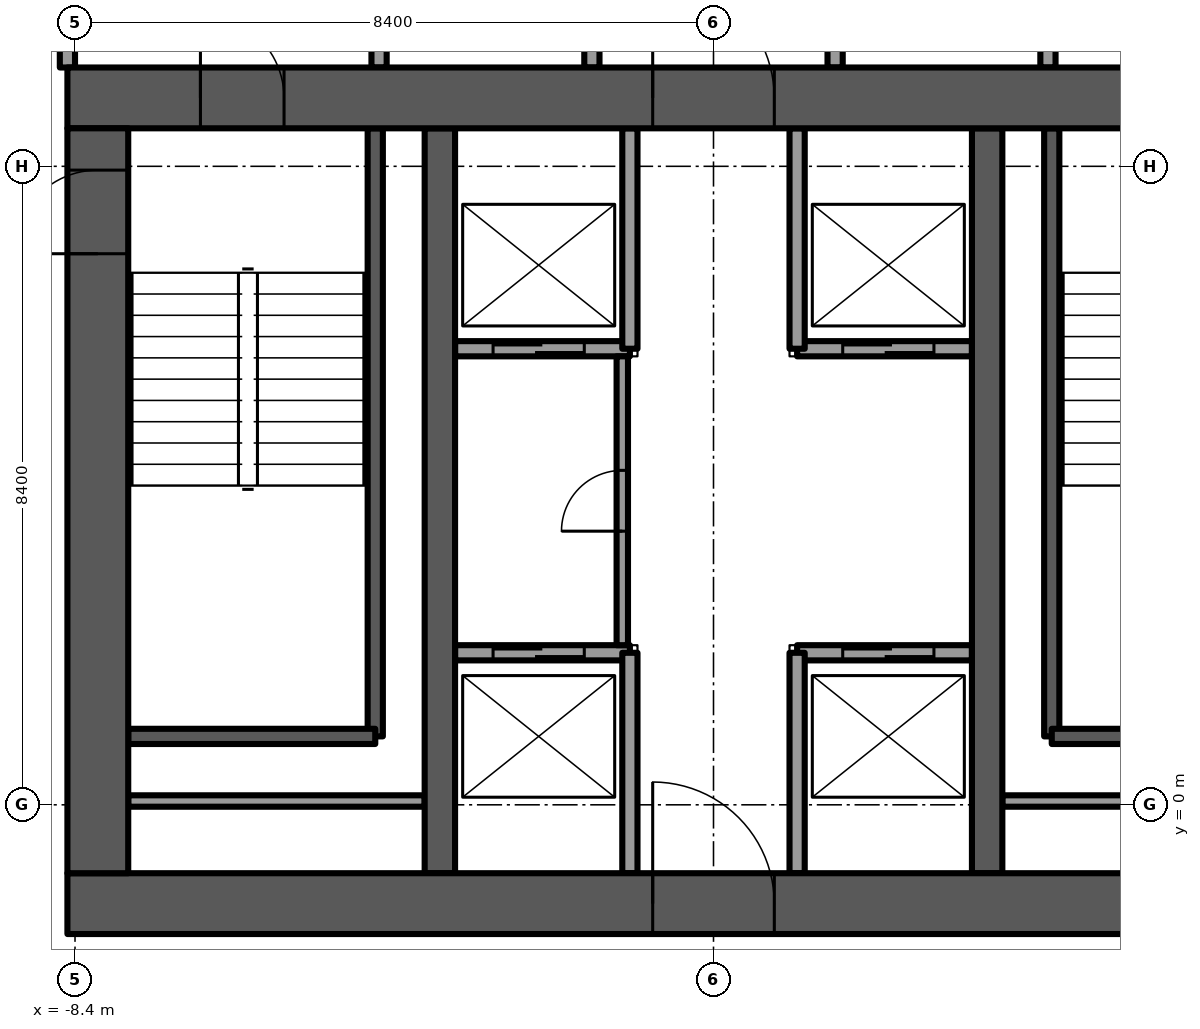
"""IFC4 building model, lengths in metres.
Left out: names, types, materials, properties, quantities, classifications, styles, units other than length and angle.
Written with IfcOpenShell. Run it as: python <this file> out.ifc"""

import sys

from ifc_helpers import new_model, si_unit, direction, frame, frame_2d, origin, place, context, subcontext, project, spatial, rectangle, extrude, element, fill, save


model = new_model("IFC4")
c1 = context("Model", 3, precision=1e-05, world=origin(), true_north=direction((0.0, 1.0)))
c2 = subcontext(c1, "Body", "Model", "MODEL_VIEW")
j1 = project(units=[si_unit("LENGTHUNIT", "METRE"), si_unit("PLANEANGLEUNIT", "RADIAN")], contexts=[c1])
p1 = place(None, origin())
s1 = spatial("IfcSite", under=j1, at=p1, CompositionType="ELEMENT")
p2 = place(p1, origin())
s2 = spatial("IfcBuilding", under=s1, at=p2, CompositionType="ELEMENT")
p3 = place(p2, frame((0.0, 0.0, 179.5)))
s3 = spatial("IfcBuildingStorey", under=s2, at=p3, CompositionType="ELEMENT", Elevation=179.5)
p4 = place(p3, frame((-8.5, -1.3, -0.3), z_axis=(0.0, 0.0, 1.0), x_axis=(1.0, 0.0, 0.0)))
e1 = element("IfcWall", 1, at=p4, inside=s3, PredefinedType="SHEAR", context=c2, shape_type="SweptSolid", body=[
    extrude(rectangle(XDim=17.0, YDim=0.8, at=frame_2d((8.5, 0.0))), origin(), (0.0, 0.0, 1.0), 3.75),
])
p5 = place(p4, frame((7.7, 0.0, 0.0)))
e2 = element("IfcOpeningElement", 2, at=p5, cuts=e1, PredefinedType="OPENING", context=c2, shape_type="SweptSolid", body=[
    extrude(rectangle(XDim=1.6, YDim=2.1, at=frame_2d((0.8, 1.05))), frame((0.0, 0.4, 0.0), z_axis=(0.0, -1.0, 0.0), x_axis=(1.0, 0.0, 0.0)), (0.0, 0.0, 1.0), 0.8),
])
p6 = place(p3, frame((-8.5, 9.3, -0.3), z_axis=(0.0, 0.0, 1.0), x_axis=(1.0, 0.0, 0.0)))
e3 = element("IfcWall", 3, at=p6, inside=s3, PredefinedType="SHEAR", context=c2, shape_type="SweptSolid", body=[
    extrude(rectangle(XDim=17.0, YDim=0.8, at=frame_2d((8.5, 0.0))), origin(), (0.0, 0.0, 1.0), 3.75),
])
p7 = place(p6, frame((7.7, 0.0, 0.0)))
e4 = element("IfcOpeningElement", 4, at=p7, cuts=e3, PredefinedType="OPENING", context=c2, shape_type="SweptSolid", body=[
    extrude(rectangle(XDim=1.6, YDim=2.1, at=frame_2d((0.8, 1.05))), frame((0.0, 0.4, 0.0), z_axis=(0.0, -1.0, 0.0), x_axis=(1.0, 0.0, 0.0)), (0.0, 0.0, 1.0), 0.8),
])
p8 = place(p6, frame((1.75, 0.0, 0.0)))
e5 = element("IfcOpeningElement", 5, at=p8, cuts=e3, PredefinedType="OPENING", context=c2, shape_type="SweptSolid", body=[
    extrude(rectangle(XDim=1.1, YDim=2.1, at=frame_2d((0.55, 1.05))), frame((0.0, 0.4, 0.0), z_axis=(0.0, -1.0, 0.0), x_axis=(1.0, 0.0, 0.0)), (0.0, 0.0, 1.0), 0.8),
])
p9 = place(p6, frame((14.15, 0.0, 0.0)))
e6 = element("IfcOpeningElement", 6, at=p9, cuts=e3, PredefinedType="OPENING", context=c2, shape_type="SweptSolid", body=[
    extrude(rectangle(XDim=1.1, YDim=2.1, at=frame_2d((0.55, 1.05))), frame((0.0, 0.4, 0.0), z_axis=(0.0, -1.0, 0.0), x_axis=(1.0, 0.0, 0.0)), (0.0, 0.0, 1.0), 0.8),
])
p10 = place(p3, frame((-8.1, -0.9, -0.3), z_axis=(0.0, 0.0, 1.0), x_axis=(0.0, 1.0, 0.0)))
e7 = element("IfcWall", 7, at=p10, inside=s3, PredefinedType="SHEAR", context=c2, shape_type="SweptSolid", body=[
    extrude(rectangle(XDim=9.8, YDim=0.8, at=frame_2d((4.9, 0.0))), origin(), (0.0, 0.0, 1.0), 3.75),
])
p11 = place(p10, frame((8.15, 0.0, 0.0)))
e8 = element("IfcOpeningElement", 8, at=p11, cuts=e7, PredefinedType="OPENING", context=c2, shape_type="SweptSolid", body=[
    extrude(rectangle(XDim=1.1, YDim=2.1, at=frame_2d((0.55, 1.05))), frame((0.0, 0.4, 0.0), z_axis=(0.0, -1.0, 0.0), x_axis=(1.0, 0.0, 0.0)), (0.0, 0.0, 1.0), 0.8),
])
for number, where, z_axis, x_axis in (
    (9, (-3.6, -0.9, -0.3), (0.0, 0.0, 1.0), (0.0, 1.0, 0.0)),
    (10, (3.6, -0.9, -0.3), (0.0, 0.0, 1.0), (0.0, 1.0, 0.0)),
):
    element("IfcWall", number, at=place(p3, frame(where, z_axis=z_axis, x_axis=x_axis)), inside=s3, PredefinedType="SHEAR", context=c2, shape_type="SweptSolid", body=[
        extrude(rectangle(XDim=9.8, YDim=0.4, at=frame_2d((4.9, 0.0))), origin(), (0.0, 0.0, 1.0), 3.75),
    ])
p12 = place(p3, frame((-7.109, 17.292, 0.0), z_axis=(0.0, 0.0, 1.0), x_axis=(-0.499999728453, -0.866025560562, 0.0)))
e11 = element("IfcWall", 11, at=p12, inside=s3, PredefinedType="SOLIDWALL", context=c2, shape_type="SweptSolid", body=[
    extrude(rectangle(XDim=20.071, YDim=0.15, at=frame_2d((10.035, 0.0))), origin(), (0.0, 0.0, 1.0), 3.45),
])
p13 = place(p12, frame((3.868, 0.0, 0.15)))
e12 = element("IfcOpeningElement", 12, at=p13, cuts=e11, PredefinedType="OPENING", context=c2, shape_type="SweptSolid", body=[
    extrude(rectangle(XDim=1.4, YDim=2.85, at=frame_2d((0.7, 1.425))), frame((0.0, 0.075, 0.0), z_axis=(0.0, -1.0, 0.0), x_axis=(1.0, 0.0, 0.0)), (0.0, 0.0, 1.0), 0.15),
])
p14 = place(p12, frame((7.521, 0.0, 0.15)))
e13 = element("IfcOpeningElement", 13, at=p14, cuts=e11, PredefinedType="OPENING", context=c2, shape_type="SweptSolid", body=[
    extrude(rectangle(XDim=1.6, YDim=2.85, at=frame_2d((0.8, 1.425))), frame((0.0, 0.075, 0.0), z_axis=(0.0, -1.0, 0.0), x_axis=(1.0, 0.0, 0.0)), (0.0, 0.0, 1.0), 0.15),
])
p15 = place(p12, frame((9.721, 0.0, 0.15)))
e14 = element("IfcOpeningElement", 14, at=p15, cuts=e11, PredefinedType="OPENING", context=c2, shape_type="SweptSolid", body=[
    extrude(rectangle(XDim=1.4, YDim=2.85, at=frame_2d((0.7, 1.425))), frame((0.0, 0.075, 0.0), z_axis=(0.0, -1.0, 0.0), x_axis=(1.0, 0.0, 0.0)), (0.0, 0.0, 1.0), 0.15),
])
p16 = place(p12, frame((11.721, 0.0, 0.15)))
e15 = element("IfcOpeningElement", 15, at=p16, cuts=e11, PredefinedType="OPENING", context=c2, shape_type="SweptSolid", body=[
    extrude(rectangle(XDim=1.6, YDim=2.85, at=frame_2d((0.8, 1.425))), frame((0.0, 0.075, 0.0), z_axis=(0.0, -1.0, 0.0), x_axis=(1.0, 0.0, 0.0)), (0.0, 0.0, 1.0), 0.15),
])
p17 = place(p12, frame((13.921, 0.0, 0.15)))
e16 = element("IfcOpeningElement", 16, at=p17, cuts=e11, PredefinedType="OPENING", context=c2, shape_type="SweptSolid", body=[
    extrude(rectangle(XDim=1.4, YDim=2.85, at=frame_2d((0.7, 1.425))), frame((0.0, 0.075, 0.0), z_axis=(0.0, -1.0, 0.0), x_axis=(1.0, 0.0, 0.0)), (0.0, 0.0, 1.0), 0.15),
])
p18 = place(p12, frame((18.121, 0.0, 0.0)))
e17 = element("IfcOpeningElement", 17, at=p18, cuts=e11, PredefinedType="OPENING", context=c2, shape_type="SweptSolid", body=[
    extrude(rectangle(XDim=1.4, YDim=2.4, at=frame_2d((0.7, 1.2))), frame((0.0, 0.075, 0.0), z_axis=(0.0, -1.0, 0.0), x_axis=(1.0, 0.0, 0.0)), (0.0, 0.0, 1.0), 0.15),
])
p19 = place(p12, frame((0.452, 0.0, 0.15)))
e18 = element("IfcOpeningElement", 18, at=p19, cuts=e11, PredefinedType="OPENING", context=c2, shape_type="SweptSolid", body=[
    extrude(rectangle(XDim=1.6, YDim=2.73, at=frame_2d((0.8, 1.365))), frame((0.0, 0.075, 0.0), z_axis=(0.0, -1.0, 0.0), x_axis=(1.0, 0.0, 0.0)), (0.0, 0.0, 1.0), 0.15),
])
p20 = place(p3, frame((-3.4, 2.0, 0.0), z_axis=(0.0, 0.0, 1.0), x_axis=(1.0, 0.0, 0.0)))
e19 = element("IfcWall", 19, at=p20, inside=s3, PredefinedType="PARTITIONING", context=c2, shape_type="SweptSolid", body=[
    extrude(rectangle(XDim=2.3, YDim=0.2, at=frame_2d((1.15, 0.0))), origin(), (0.0, 0.0, 1.0), 3.45),
])
p21 = place(p20, frame((0.5, 0.0, 0.0)))
e20 = element("IfcOpeningElement", 20, at=p21, cuts=e19, PredefinedType="OPENING", context=c2, shape_type="SweptSolid", body=[
    extrude(rectangle(XDim=1.2, YDim=2.1, at=frame_2d((0.6, 1.05))), frame((0.0, 0.1, 0.0), z_axis=(0.0, -1.0, 0.0), x_axis=(1.0, 0.0, 0.0)), (0.0, 0.0, 1.0), 0.2),
])
p22 = place(p3, frame((-3.4, 6.0, 0.0), z_axis=(0.0, 0.0, 1.0), x_axis=(1.0, 0.0, 0.0)))
e21 = element("IfcWall", 21, at=p22, inside=s3, PredefinedType="PARTITIONING", context=c2, shape_type="SweptSolid", body=[
    extrude(rectangle(XDim=2.3, YDim=0.2, at=frame_2d((1.15, 0.0))), origin(), (0.0, 0.0, 1.0), 3.45),
])
p23 = place(p22, frame((0.5, 0.0, 0.0)))
e22 = element("IfcOpeningElement", 22, at=p23, cuts=e21, PredefinedType="OPENING", context=c2, shape_type="SweptSolid", body=[
    extrude(rectangle(XDim=1.2, YDim=2.1, at=frame_2d((0.6, 1.05))), frame((0.0, 0.1, 0.0), z_axis=(0.0, -1.0, 0.0), x_axis=(1.0, 0.0, 0.0)), (0.0, 0.0, 1.0), 0.2),
])
p24 = place(p3, frame((1.1, 2.0, 0.0), z_axis=(0.0, 0.0, 1.0), x_axis=(1.0, 0.0, 0.0)))
e23 = element("IfcWall", 23, at=p24, inside=s3, PredefinedType="PARTITIONING", context=c2, shape_type="SweptSolid", body=[
    extrude(rectangle(XDim=2.3, YDim=0.2, at=frame_2d((1.15, 0.0))), origin(), (0.0, 0.0, 1.0), 3.45),
])
p25 = place(p24, frame((0.6, 0.0, 0.0)))
e24 = element("IfcOpeningElement", 24, at=p25, cuts=e23, PredefinedType="OPENING", context=c2, shape_type="SweptSolid", body=[
    extrude(rectangle(XDim=1.2, YDim=2.1, at=frame_2d((0.6, 1.05))), frame((0.0, 0.1, 0.0), z_axis=(0.0, -1.0, 0.0), x_axis=(1.0, 0.0, 0.0)), (0.0, 0.0, 1.0), 0.2),
])
p26 = place(p3, frame((1.1, 6.0, 0.0), z_axis=(0.0, 0.0, 1.0), x_axis=(1.0, 0.0, 0.0)))
e25 = element("IfcWall", 25, at=p26, inside=s3, PredefinedType="PARTITIONING", context=c2, shape_type="SweptSolid", body=[
    extrude(rectangle(XDim=2.3, YDim=0.2, at=frame_2d((1.15, 0.0))), origin(), (0.0, 0.0, 1.0), 3.45),
])
p27 = place(p26, frame((0.6, 0.0, 0.0)))
e26 = element("IfcOpeningElement", 26, at=p27, cuts=e25, PredefinedType="OPENING", context=c2, shape_type="SweptSolid", body=[
    extrude(rectangle(XDim=1.2, YDim=2.1, at=frame_2d((0.6, 1.05))), frame((0.0, 0.1, 0.0), z_axis=(0.0, -1.0, 0.0), x_axis=(1.0, 0.0, 0.0)), (0.0, 0.0, 1.0), 0.2),
])
for number, where, z_axis, x_axis in (
    (27, (-1.1, -0.9, 0.0), (0.0, 0.0, 1.0), (0.0, 1.0, 0.0)),
    (28, (1.1, -0.9, 0.0), (0.0, 0.0, 1.0), (0.0, 1.0, 0.0)),
    (29, (-1.1, 6.0, 0.0), (0.0, 0.0, 1.0), (0.0, 1.0, 0.0)),
    (30, (1.1, 6.0, 0.0), (0.0, 0.0, 1.0), (0.0, 1.0, 0.0)),
):
    element("IfcWall", number, at=place(p3, frame(where, z_axis=z_axis, x_axis=x_axis)), inside=s3, PredefinedType="PARTITIONING", context=c2, shape_type="SweptSolid", body=[
        extrude(rectangle(XDim=2.9, YDim=0.2, at=frame_2d((1.45, 0.0))), origin(), (0.0, 0.0, 1.0), 3.45),
    ])
p28 = place(p3, frame((-4.45, 0.9, -0.3), z_axis=(0.0, 0.0, 1.0), x_axis=(0.0, 1.0, 0.0)))
e31 = element("IfcWall", 31, at=p28, inside=s3, PredefinedType="SOLIDWALL", context=c2, shape_type="SweptSolid", body=[
    extrude(rectangle(XDim=8.0, YDim=0.2, at=frame_2d((4.0, 0.0))), origin(), (0.0, 0.0, 1.0), 3.75),
])
p29 = place(p3, frame((-7.7, 0.9, -0.3), z_axis=(0.0, 0.0, 1.0), x_axis=(1.0, 0.0, 0.0)))
e32 = element("IfcWall", 32, at=p29, inside=s3, PredefinedType="SOLIDWALL", context=c2, shape_type="SweptSolid", body=[
    extrude(rectangle(XDim=3.25, YDim=0.2, at=frame_2d((1.625, 0.0))), origin(), (0.0, 0.0, 1.0), 3.75),
])
p30 = place(p3, frame((-7.7, 0.05, 0.0), z_axis=(0.0, 0.0, 1.0), x_axis=(1.0, 0.0, 0.0)))
e33 = element("IfcWall", 33, at=p30, inside=s3, PredefinedType="PARTITIONING", context=c2, shape_type="SweptSolid", body=[
    extrude(rectangle(XDim=3.9, YDim=0.15, at=frame_2d((1.95, 0.0))), origin(), (0.0, 0.0, 1.0), 3.45),
])
p31 = place(p3, frame((4.45, 0.9, -0.3), z_axis=(0.0, 0.0, 1.0), x_axis=(0.0, 1.0, 0.0)))
e34 = element("IfcWall", 34, at=p31, inside=s3, PredefinedType="SOLIDWALL", context=c2, shape_type="SweptSolid", body=[
    extrude(rectangle(XDim=8.0, YDim=0.2, at=frame_2d((4.0, 0.0))), origin(), (0.0, 0.0, 1.0), 3.75),
])
p32 = place(p3, frame((4.45, 0.9, -0.3), z_axis=(0.0, 0.0, 1.0), x_axis=(1.0, 0.0, 0.0)))
e35 = element("IfcWall", 35, at=p32, inside=s3, PredefinedType="SOLIDWALL", context=c2, shape_type="SweptSolid", body=[
    extrude(rectangle(XDim=3.25, YDim=0.2, at=frame_2d((1.625, 0.0))), origin(), (0.0, 0.0, 1.0), 3.75),
])
p33 = place(p3, frame((3.8, 0.05, 0.0), z_axis=(0.0, 0.0, 1.0), x_axis=(1.0, 0.0, 0.0)))
e36 = element("IfcWall", 36, at=p33, inside=s3, PredefinedType="PARTITIONING", context=c2, shape_type="SweptSolid", body=[
    extrude(rectangle(XDim=3.9, YDim=0.15, at=frame_2d((1.95, 0.0))), origin(), (0.0, 0.0, 1.0), 3.45),
])
p34 = place(p3, frame((-8.5, 9.7, 0.0), z_axis=(0.0, 0.0, 1.0), x_axis=(0.0, 1.0, 0.0)))
e37 = element("IfcWall", 37, at=p34, inside=s3, PredefinedType="PARTITIONING", context=c2, shape_type="SweptSolid", body=[
    extrude(rectangle(XDim=3.9, YDim=0.2, at=frame_2d((1.95, 0.0))), origin(), (0.0, 0.0, 1.0), 3.45),
])
p35 = place(p34, frame((1.35, 0.0, 0.0)))
e38 = element("IfcOpeningElement", 38, at=p35, cuts=e37, PredefinedType="OPENING", context=c2, shape_type="SweptSolid", body=[
    extrude(rectangle(XDim=1.2, YDim=2.1, at=frame_2d((0.6, 1.05))), frame((0.0, 0.1, 0.0), z_axis=(0.0, -1.0, 0.0), x_axis=(1.0, 0.0, 0.0)), (0.0, 0.0, 1.0), 0.2),
])
p36 = place(p3, frame((-4.4, 9.7, 0.0), z_axis=(0.0, 0.0, 1.0), x_axis=(0.0, 1.0, 0.0)))
e39 = element("IfcWall", 39, at=p36, inside=s3, PredefinedType="PARTITIONING", context=c2, shape_type="SweptSolid", body=[
    extrude(rectangle(XDim=3.9, YDim=0.2, at=frame_2d((1.95, 0.0))), origin(), (0.0, 0.0, 1.0), 3.45),
])
p37 = place(p36, frame((1.35, 0.0, 0.0)))
e40 = element("IfcOpeningElement", 40, at=p37, cuts=e39, PredefinedType="OPENING", context=c2, shape_type="SweptSolid", body=[
    extrude(rectangle(XDim=1.2, YDim=2.1, at=frame_2d((0.6, 1.05))), frame((0.0, 0.1, 0.0), z_axis=(0.0, -1.0, 0.0), x_axis=(1.0, 0.0, 0.0)), (0.0, 0.0, 1.0), 0.2),
])
p38 = place(p3, frame((4.4, 9.7, 0.0), z_axis=(0.0, 0.0, 1.0), x_axis=(0.0, 1.0, 0.0)))
e41 = element("IfcWall", 41, at=p38, inside=s3, PredefinedType="PARTITIONING", context=c2, shape_type="SweptSolid", body=[
    extrude(rectangle(XDim=3.9, YDim=0.2, at=frame_2d((1.95, 0.0))), origin(), (0.0, 0.0, 1.0), 3.45),
])
p39 = place(p38, frame((1.35, 0.0, 0.0)))
e42 = element("IfcOpeningElement", 42, at=p39, cuts=e41, PredefinedType="OPENING", context=c2, shape_type="SweptSolid", body=[
    extrude(rectangle(XDim=1.2, YDim=2.1, at=frame_2d((0.6, 1.05))), frame((0.0, 0.1, 0.0), z_axis=(0.0, -1.0, 0.0), x_axis=(1.0, 0.0, 0.0)), (0.0, 0.0, 1.0), 0.2),
])
for number, where, z_axis, x_axis in (
    (43, (-1.6, 9.7, 0.0), (0.0, 0.0, 1.0), (0.0, 1.0, 0.0)),
    (44, (1.6, 9.7, 0.0), (0.0, 0.0, 1.0), (0.0, 1.0, 0.0)),
):
    element("IfcWall", number, at=place(p3, frame(where, z_axis=z_axis, x_axis=x_axis)), inside=s3, PredefinedType="PARTITIONING", context=c2, shape_type="SweptSolid", body=[
        extrude(rectangle(XDim=3.9, YDim=0.2, at=frame_2d((1.95, 0.0))), origin(), (0.0, 0.0, 1.0), 3.45),
    ])
p40 = place(p3, frame((-1.2, 2.1, 0.0), z_axis=(0.0, 0.0, 1.0), x_axis=(0.0, 1.0, 0.0)))
e45 = element("IfcWall", 45, at=p40, inside=s3, PredefinedType="PARTITIONING", context=c2, shape_type="SweptSolid", body=[
    extrude(rectangle(XDim=3.8, YDim=0.15, at=frame_2d((1.9, 0.0))), origin(), (0.0, 0.0, 1.0), 3.45),
])
p41 = place(p40, frame((1.5, 0.0, 0.0)))
e46 = element("IfcOpeningElement", 46, at=p41, cuts=e45, PredefinedType="OPENING", context=c2, shape_type="SweptSolid", body=[
    extrude(rectangle(XDim=0.8, YDim=2.1, at=frame_2d((0.4, 1.05))), frame((0.0, 0.075, 0.0), z_axis=(0.0, -1.0, 0.0), x_axis=(1.0, 0.0, 0.0)), (0.0, 0.0, 1.0), 0.15),
])
p42 = place(p21, origin())
e47 = element("IfcDoor", 47, at=p42, inside=s3, OperationType="SLIDING_TO_LEFT", PredefinedType="DOOR", context=c2, shape_type="SweptSolid", body=[
    extrude(rectangle(XDim=1.2, YDim=2.1, at=frame_2d((0.6, 1.05))), frame((0.0, 0.025, 0.0), z_axis=(0.0, -1.0, 0.0), x_axis=(1.0, 0.0, 0.0)), (0.0, 0.0, 1.0), 0.05),
])
fill(e20, e47)
p43 = place(p25, origin())
e48 = element("IfcDoor", 48, at=p43, inside=s3, OperationType="SLIDING_TO_LEFT", PredefinedType="DOOR", context=c2, shape_type="SweptSolid", body=[
    extrude(rectangle(XDim=1.2, YDim=2.1, at=frame_2d((0.6, 1.05))), frame((0.0, 0.025, 0.0), z_axis=(0.0, -1.0, 0.0), x_axis=(1.0, 0.0, 0.0)), (0.0, 0.0, 1.0), 0.05),
])
fill(e24, e48)
p44 = place(p23, origin())
e49 = element("IfcDoor", 49, at=p44, inside=s3, OperationType="SLIDING_TO_LEFT", PredefinedType="DOOR", context=c2, shape_type="SweptSolid", body=[
    extrude(rectangle(XDim=1.2, YDim=2.1, at=frame_2d((0.6, 1.05))), frame((0.0, 0.025, 0.0), z_axis=(0.0, -1.0, 0.0), x_axis=(1.0, 0.0, 0.0)), (0.0, 0.0, 1.0), 0.05),
])
fill(e22, e49)
p45 = place(p27, origin())
e50 = element("IfcDoor", 50, at=p45, inside=s3, OperationType="SLIDING_TO_LEFT", PredefinedType="DOOR", context=c2, shape_type="SweptSolid", body=[
    extrude(rectangle(XDim=1.2, YDim=2.1, at=frame_2d((0.6, 1.05))), frame((0.0, 0.025, 0.0), z_axis=(0.0, -1.0, 0.0), x_axis=(1.0, 0.0, 0.0)), (0.0, 0.0, 1.0), 0.05),
])
fill(e26, e50)
p46 = place(p5, origin())
e51 = element("IfcDoor", 51, at=p46, inside=s3, OperationType="DOUBLE_DOOR_SINGLE_SWING", PredefinedType="DOOR", context=c2, shape_type="SweptSolid", body=[
    extrude(rectangle(XDim=1.6, YDim=2.1, at=frame_2d((0.8, 1.05))), frame((0.0, 0.025, 0.0), z_axis=(0.0, -1.0, 0.0), x_axis=(1.0, 0.0, 0.0)), (0.0, 0.0, 1.0), 0.05),
])
fill(e2, e51)
p47 = place(p7, origin())
e52 = element("IfcDoor", 52, at=p47, inside=s3, OperationType="DOUBLE_DOOR_SINGLE_SWING", PredefinedType="DOOR", context=c2, shape_type="SweptSolid", body=[
    extrude(rectangle(XDim=1.6, YDim=2.1, at=frame_2d((0.8, 1.05))), frame((0.0, 0.025, 0.0), z_axis=(0.0, -1.0, 0.0), x_axis=(1.0, 0.0, 0.0)), (0.0, 0.0, 1.0), 0.05),
])
fill(e4, e52)
p48 = place(p8, origin())
e53 = element("IfcDoor", 53, at=p48, inside=s3, OperationType="SINGLE_SWING_LEFT", PredefinedType="DOOR", context=c2, shape_type="SweptSolid", body=[
    extrude(rectangle(XDim=1.1, YDim=2.1, at=frame_2d((0.55, 1.05))), frame((0.0, 0.025, 0.0), z_axis=(0.0, -1.0, 0.0), x_axis=(1.0, 0.0, 0.0)), (0.0, 0.0, 1.0), 0.05),
])
fill(e5, e53)
p49 = place(p11, origin())
e54 = element("IfcDoor", 54, at=p49, inside=s3, OperationType="SINGLE_SWING_RIGHT", PredefinedType="DOOR", context=c2, shape_type="SweptSolid", body=[
    extrude(rectangle(XDim=1.1, YDim=2.1, at=frame_2d((0.55, 1.05))), frame((0.0, 0.025, 0.0), z_axis=(0.0, -1.0, 0.0), x_axis=(1.0, 0.0, 0.0)), (0.0, 0.0, 1.0), 0.05),
])
fill(e8, e54)
p50 = place(p41, origin())
e55 = element("IfcDoor", 55, at=p50, inside=s3, OperationType="SINGLE_SWING_LEFT", PredefinedType="DOOR", context=c2, shape_type="SweptSolid", body=[
    extrude(rectangle(XDim=0.8, YDim=2.1, at=frame_2d((0.4, 1.05))), frame((0.0, 0.025, 0.0), z_axis=(0.0, -1.0, 0.0), x_axis=(1.0, 0.0, 0.0)), (0.0, 0.0, 1.0), 0.05),
])
fill(e46, e55)
save(model, sys.argv[1])
